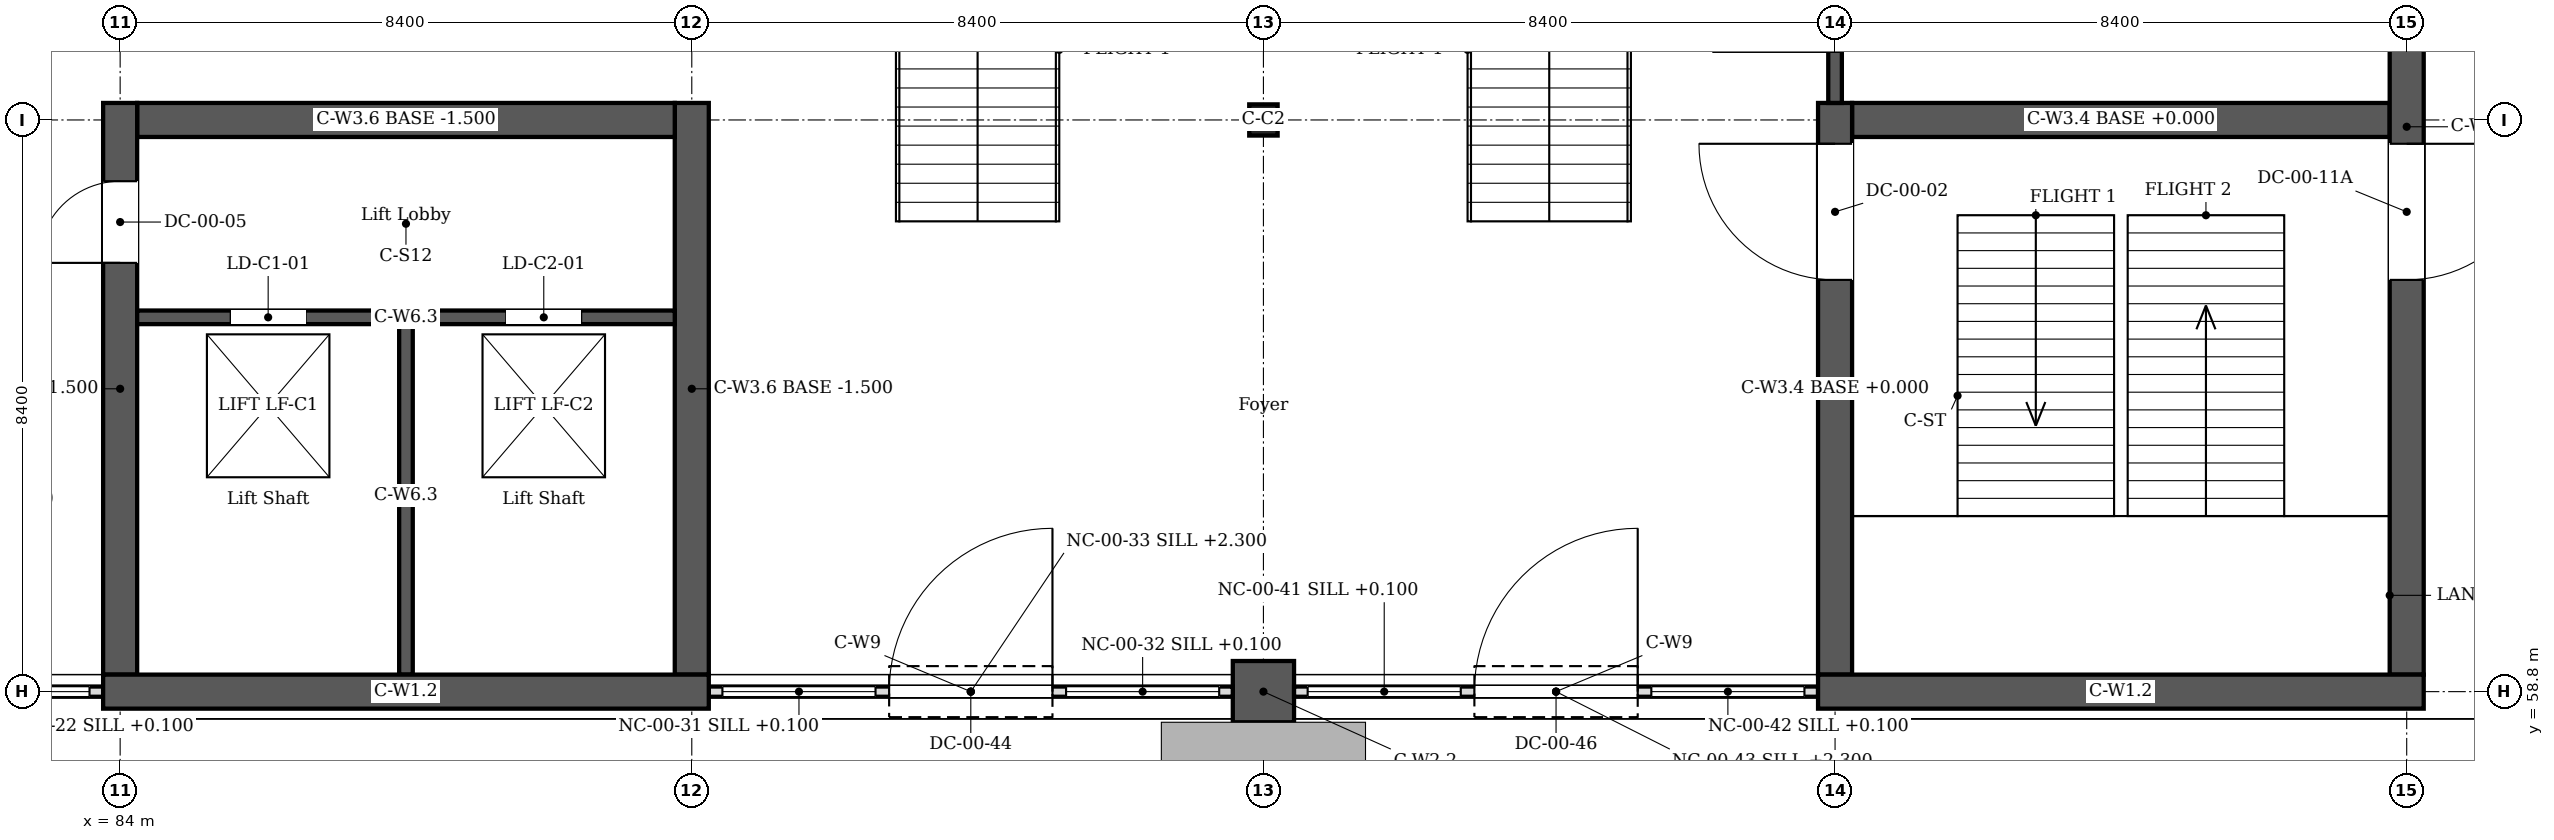
"""IFC4 building model, lengths in metres.
Left out: names, types, materials, properties, quantities, classifications, styles, units other than length and angle.
Written with IfcOpenShell. Run it as: python <this file> out.ifc"""

import sys

from ifc_helpers import new_model, si_unit, direction, frame, frame_2d, origin, origin_2d, place, context, subcontext, project, spatial, rectangle, i_section, extrude, element, fill, save


model = new_model("IFC4")
c1 = context("Model", 3, precision=1e-05, world=origin(), true_north=direction((0.0, 1.0)))
c2 = subcontext(c1, "Body", "Model", "MODEL_VIEW")
j1 = project(units=[si_unit("LENGTHUNIT", "METRE"), si_unit("PLANEANGLEUNIT", "RADIAN")], contexts=[c1])
p1 = place(None, origin())
s1 = spatial("IfcSite", under=j1, at=p1, CompositionType="ELEMENT")
p2 = place(p1, origin())
s2 = spatial("IfcBuilding", under=s1, at=p2, CompositionType="ELEMENT")
p3 = place(p2, origin())
s3 = spatial("IfcBuildingStorey", under=s2, at=p3, CompositionType="ELEMENT", Elevation=0.0)
p4 = place(p3, frame((92.65, 58.8, 0.0), z_axis=(0.0, 0.0, 1.0), x_axis=(-1.0, 0.0, 0.0)))
e1 = element("IfcWall", 1, at=p4, inside=s3, PredefinedType="SOLIDWALL", context=c2, shape_type="SweptSolid", body=[
    extrude(rectangle(XDim=8.9, YDim=0.5, at=frame_2d((4.45, 0.0))), origin(), (0.0, 0.0, 1.0), 6.0),
])
p5 = place(p3, frame((117.85, 58.8, 0.0), z_axis=(0.0, 0.0, 1.0), x_axis=(-1.0, 0.0, 0.0)))
e2 = element("IfcWall", 2, at=p5, inside=s3, PredefinedType="SOLIDWALL", context=c2, shape_type="SweptSolid", body=[
    extrude(rectangle(XDim=8.9, YDim=0.5, at=frame_2d((4.45, 0.0))), origin(), (0.0, 0.0, 1.0), 6.0),
])
p6 = place(p3, frame((100.35, 58.8, 0.0), z_axis=(0.0, 0.0, 1.0), x_axis=(1.0, 0.0, 0.0)))
e3 = element("IfcWall", 3, at=p6, inside=s3, PredefinedType="SOLIDWALL", context=c2, shape_type="SweptSolid", body=[
    extrude(rectangle(XDim=0.9, YDim=0.9, at=frame_2d((0.45, 0.0))), origin(), (0.0, 0.0, 1.0), 6.0),
])
p7 = place(p3, frame((117.6, 75.15, 0.0), z_axis=(0.0, 0.0, 1.0), x_axis=(0.0, -1.0, 0.0)))
e4 = element("IfcWall", 4, at=p7, inside=s3, PredefinedType="SOLIDWALL", context=c2, shape_type="SweptSolid", body=[
    extrude(rectangle(XDim=16.1, YDim=0.5, at=frame_2d((8.05, 0.0))), origin(), (0.0, 0.0, 1.0), 6.0),
])
p8 = place(p7, frame((8.3, 0.0, 0.0)))
e5 = element("IfcOpeningElement", 5, at=p8, cuts=e4, PredefinedType="OPENING", context=c2, shape_type="SweptSolid", body=[
    extrude(rectangle(XDim=2.0, YDim=2.1, at=frame_2d((1.0, 1.05))), frame((0.0, 0.26, 0.0), z_axis=(0.0, -1.0, 0.0), x_axis=(1.0, 0.0, 0.0)), (0.0, 0.0, 1.0), 0.52),
])
p9 = place(p3, frame((100.8, 67.2, 0.0), z_axis=(0.0, 0.0, 1.0), x_axis=(1.0, 0.0, 0.0)))
e6 = element("IfcColumn", 6, at=p9, inside=s3, PredefinedType="COLUMN", context=c2, shape_type="SweptSolid", body=[
    extrude(i_section(OverallWidth=0.417, OverallDepth=0.458, WebThickness=0.03, FlangeThickness=0.05, FilletRadius=0.022, at=origin_2d()), origin(), (0.0, 0.0, 1.0), 6.0),
])
p10 = place(p3, frame((76.05, 58.8, 0.0), z_axis=(0.0, 0.0, 1.0), x_axis=(1.0, 0.0, 0.0)))
e7 = element("IfcWall", 7, at=p10, inside=s3, PredefinedType="SOLIDWALL", context=c2, shape_type="SweptSolid", body=[
    extrude(rectangle(XDim=7.7, YDim=0.15, at=frame_2d((3.85, 0.0))), origin(), (0.0, 0.0, 1.0), 6.0),
])
p11 = place(p10, frame((2.65, 0.0, 0.0)))
e8 = element("IfcOpeningElement", 8, at=p11, cuts=e7, PredefinedType="OPENING", context=c2, shape_type="SweptSolid", body=[
    extrude(rectangle(XDim=2.4, YDim=2.1, at=frame_2d((1.2, 1.05))), frame((0.0, 0.085, 0.0), z_axis=(0.0, -1.0, 0.0), x_axis=(1.0, 0.0, 0.0)), (0.0, 0.0, 1.0), 0.17),
])
p12 = place(p10, frame((0.2, 0.0, 0.1)))
e9 = element("IfcOpeningElement", 9, at=p12, cuts=e7, PredefinedType="OPENING", context=c2, shape_type="SweptSolid", body=[
    extrude(rectangle(XDim=2.25, YDim=5.0, at=frame_2d((1.125, 2.5))), frame((0.0, 0.085, 0.0), z_axis=(0.0, -1.0, 0.0), x_axis=(1.0, 0.0, 0.0)), (0.0, 0.0, 1.0), 0.17),
])
p13 = place(p10, frame((5.25, 0.0, 0.1)))
e10 = element("IfcOpeningElement", 10, at=p13, cuts=e7, PredefinedType="OPENING", context=c2, shape_type="SweptSolid", body=[
    extrude(rectangle(XDim=2.25, YDim=5.0, at=frame_2d((1.125, 2.5))), frame((0.0, 0.085, 0.0), z_axis=(0.0, -1.0, 0.0), x_axis=(1.0, 0.0, 0.0)), (0.0, 0.0, 1.0), 0.17),
])
p14 = place(p10, frame((2.65, 0.0, 2.3)))
e11 = element("IfcOpeningElement", 11, at=p14, cuts=e7, PredefinedType="OPENING", context=c2, shape_type="SweptSolid", body=[
    extrude(rectangle(XDim=2.4, YDim=3.4, at=frame_2d((1.2, 1.7))), frame((0.0, 0.085, 0.0), z_axis=(0.0, -1.0, 0.0), x_axis=(1.0, 0.0, 0.0)), (0.0, 0.0, 1.0), 0.17),
])
p15 = place(p3, frame((92.65, 58.8, 0.0), z_axis=(0.0, 0.0, 1.0), x_axis=(1.0, 0.0, 0.0)))
e12 = element("IfcWall", 12, at=p15, inside=s3, PredefinedType="SOLIDWALL", context=c2, shape_type="SweptSolid", body=[
    extrude(rectangle(XDim=7.7, YDim=0.15, at=frame_2d((3.85, 0.0))), origin(), (0.0, 0.0, 1.0), 6.0),
])
p16 = place(p15, frame((2.65, 0.0, 0.0)))
e13 = element("IfcOpeningElement", 13, at=p16, cuts=e12, PredefinedType="OPENING", context=c2, shape_type="SweptSolid", body=[
    extrude(rectangle(XDim=2.4, YDim=2.1, at=frame_2d((1.2, 1.05))), frame((0.0, 0.085, 0.0), z_axis=(0.0, -1.0, 0.0), x_axis=(1.0, 0.0, 0.0)), (0.0, 0.0, 1.0), 0.17),
])
p17 = place(p15, frame((0.2, 0.0, 0.1)))
e14 = element("IfcOpeningElement", 14, at=p17, cuts=e12, PredefinedType="OPENING", context=c2, shape_type="SweptSolid", body=[
    extrude(rectangle(XDim=2.25, YDim=5.0, at=frame_2d((1.125, 2.5))), frame((0.0, 0.085, 0.0), z_axis=(0.0, -1.0, 0.0), x_axis=(1.0, 0.0, 0.0)), (0.0, 0.0, 1.0), 0.17),
])
p18 = place(p15, frame((5.25, 0.0, 0.1)))
e15 = element("IfcOpeningElement", 15, at=p18, cuts=e12, PredefinedType="OPENING", context=c2, shape_type="SweptSolid", body=[
    extrude(rectangle(XDim=2.25, YDim=5.0, at=frame_2d((1.125, 2.5))), frame((0.0, 0.085, 0.0), z_axis=(0.0, -1.0, 0.0), x_axis=(1.0, 0.0, 0.0)), (0.0, 0.0, 1.0), 0.17),
])
p19 = place(p15, frame((2.65, 0.0, 2.3)))
e16 = element("IfcOpeningElement", 16, at=p19, cuts=e12, PredefinedType="OPENING", context=c2, shape_type="SweptSolid", body=[
    extrude(rectangle(XDim=2.4, YDim=3.4, at=frame_2d((1.2, 1.7))), frame((0.0, 0.085, 0.0), z_axis=(0.0, -1.0, 0.0), x_axis=(1.0, 0.0, 0.0)), (0.0, 0.0, 1.0), 0.17),
])
p20 = place(p3, frame((101.25, 58.8, 0.0), z_axis=(0.0, 0.0, 1.0), x_axis=(1.0, 0.0, 0.0)))
e17 = element("IfcWall", 17, at=p20, inside=s3, PredefinedType="SOLIDWALL", context=c2, shape_type="SweptSolid", body=[
    extrude(rectangle(XDim=7.7, YDim=0.15, at=frame_2d((3.85, 0.0))), origin(), (0.0, 0.0, 1.0), 6.0),
])
p21 = place(p20, frame((2.65, 0.0, 0.0)))
e18 = element("IfcOpeningElement", 18, at=p21, cuts=e17, PredefinedType="OPENING", context=c2, shape_type="SweptSolid", body=[
    extrude(rectangle(XDim=2.4, YDim=2.1, at=frame_2d((1.2, 1.05))), frame((0.0, 0.085, 0.0), z_axis=(0.0, -1.0, 0.0), x_axis=(1.0, 0.0, 0.0)), (0.0, 0.0, 1.0), 0.17),
])
p22 = place(p20, frame((0.2, 0.0, 0.1)))
e19 = element("IfcOpeningElement", 19, at=p22, cuts=e17, PredefinedType="OPENING", context=c2, shape_type="SweptSolid", body=[
    extrude(rectangle(XDim=2.25, YDim=5.0, at=frame_2d((1.125, 2.5))), frame((0.0, 0.085, 0.0), z_axis=(0.0, -1.0, 0.0), x_axis=(1.0, 0.0, 0.0)), (0.0, 0.0, 1.0), 0.17),
])
p23 = place(p20, frame((5.25, 0.0, 0.1)))
e20 = element("IfcOpeningElement", 20, at=p23, cuts=e17, PredefinedType="OPENING", context=c2, shape_type="SweptSolid", body=[
    extrude(rectangle(XDim=2.25, YDim=5.0, at=frame_2d((1.125, 2.5))), frame((0.0, 0.085, 0.0), z_axis=(0.0, -1.0, 0.0), x_axis=(1.0, 0.0, 0.0)), (0.0, 0.0, 1.0), 0.17),
])
p24 = place(p20, frame((2.65, 0.0, 2.3)))
e21 = element("IfcOpeningElement", 21, at=p24, cuts=e17, PredefinedType="OPENING", context=c2, shape_type="SweptSolid", body=[
    extrude(rectangle(XDim=2.4, YDim=3.4, at=frame_2d((1.2, 1.7))), frame((0.0, 0.085, 0.0), z_axis=(0.0, -1.0, 0.0), x_axis=(1.0, 0.0, 0.0)), (0.0, 0.0, 1.0), 0.17),
])
p25 = place(p3, frame((109.2, 59.05, 0.0), z_axis=(0.0, 0.0, 1.0), x_axis=(0.0, 1.0, 0.0)))
e22 = element("IfcWall", 22, at=p25, inside=s3, PredefinedType="SOLIDWALL", context=c2, shape_type="SweptSolid", body=[
    extrude(rectangle(XDim=8.4, YDim=0.5, at=frame_2d((4.2, 0.0))), origin(), (0.0, 0.0, 1.0), 6.0),
])
p26 = place(p25, frame((5.8, 0.0, 0.0)))
e23 = element("IfcOpeningElement", 23, at=p26, cuts=e22, PredefinedType="OPENING", context=c2, shape_type="SweptSolid", body=[
    extrude(rectangle(XDim=2.0, YDim=2.1, at=frame_2d((1.0, 1.05))), frame((0.0, 0.26, 0.0), z_axis=(0.0, -1.0, 0.0), x_axis=(1.0, 0.0, 0.0)), (0.0, 0.0, 1.0), 0.52),
])
p27 = place(p3, frame((109.45, 67.2, 0.0), z_axis=(0.0, 0.0, 1.0), x_axis=(1.0, 0.0, 0.0)))
e24 = element("IfcWall", 24, at=p27, inside=s3, PredefinedType="SOLIDWALL", context=c2, shape_type="SweptSolid", body=[
    extrude(rectangle(XDim=7.9, YDim=0.5, at=frame_2d((3.95, 0.0))), origin(), (0.0, 0.0, 1.0), 6.0),
])
p28 = place(p3, frame((92.4, 59.05, -1.5), z_axis=(0.0, 0.0, 1.0), x_axis=(0.0, 1.0, 0.0)))
e25 = element("IfcWall", 25, at=p28, inside=s3, PredefinedType="SOLIDWALL", context=c2, shape_type="SweptSolid", body=[
    extrude(rectangle(XDim=8.4, YDim=0.5, at=frame_2d((4.2, 0.0))), origin(), (0.0, 0.0, 1.0), 7.5),
])
p29 = place(p3, frame((84.0, 59.05, -1.5), z_axis=(0.0, 0.0, 1.0), x_axis=(0.0, 1.0, 0.0)))
e26 = element("IfcWall", 26, at=p29, inside=s3, PredefinedType="SOLIDWALL", context=c2, shape_type="SweptSolid", body=[
    extrude(rectangle(XDim=8.4, YDim=0.5, at=frame_2d((4.2, 0.0))), origin(), (0.0, 0.0, 1.0), 7.5),
])
p30 = place(p29, frame((6.05, 0.0, 1.5)))
e27 = element("IfcOpeningElement", 27, at=p30, cuts=e26, PredefinedType="OPENING", context=c2, shape_type="SweptSolid", body=[
    extrude(rectangle(XDim=1.2, YDim=2.1, at=frame_2d((0.6, 1.05))), frame((0.0, 0.26, 0.0), z_axis=(0.0, -1.0, 0.0), x_axis=(1.0, 0.0, 0.0)), (0.0, 0.0, 1.0), 0.52),
])
p31 = place(p3, frame((84.25, 67.2, -1.5), z_axis=(0.0, 0.0, 1.0), x_axis=(1.0, 0.0, 0.0)))
e28 = element("IfcWall", 28, at=p31, inside=s3, PredefinedType="SOLIDWALL", context=c2, shape_type="SweptSolid", body=[
    extrude(rectangle(XDim=7.9, YDim=0.5, at=frame_2d((3.95, 0.0))), origin(), (0.0, 0.0, 1.0), 7.5),
])
p32 = place(p3, frame((88.2, 59.05, -1.5), z_axis=(0.0, 0.0, 1.0), x_axis=(0.0, 1.0, 0.0)))
e29 = element("IfcWall", 29, at=p32, inside=s3, PredefinedType="PARTITIONING", context=c2, shape_type="SweptSolid", body=[
    extrude(rectangle(XDim=5.25, YDim=0.2, at=frame_2d((2.625, 0.0))), origin(), (0.0, 0.0, 1.0), 7.5),
])
p33 = place(p3, frame((84.25, 64.3, -1.5), z_axis=(0.0, 0.0, 1.0), x_axis=(1.0, 0.0, 0.0)))
e30 = element("IfcWall", 30, at=p33, inside=s3, PredefinedType="PARTITIONING", context=c2, shape_type="SweptSolid", body=[
    extrude(rectangle(XDim=7.9, YDim=0.2, at=frame_2d((3.95, 0.0))), origin(), (0.0, 0.0, 1.0), 7.5),
])
p34 = place(p33, frame((1.375, 0.0, 1.5)))
e31 = element("IfcOpeningElement", 31, at=p34, cuts=e30, PredefinedType="OPENING", context=c2, shape_type="SweptSolid", body=[
    extrude(rectangle(XDim=1.1, YDim=2.1, at=frame_2d((0.55, 1.05))), frame((0.0, 0.11, 0.0), z_axis=(0.0, -1.0, 0.0), x_axis=(1.0, 0.0, 0.0)), (0.0, 0.0, 1.0), 0.22),
])
p35 = place(p33, frame((5.425, 0.0, 1.5)))
e32 = element("IfcOpeningElement", 32, at=p35, cuts=e30, PredefinedType="OPENING", context=c2, shape_type="SweptSolid", body=[
    extrude(rectangle(XDim=1.1, YDim=2.1, at=frame_2d((0.55, 1.05))), frame((0.0, 0.11, 0.0), z_axis=(0.0, -1.0, 0.0), x_axis=(1.0, 0.0, 0.0)), (0.0, 0.0, 1.0), 0.22),
])
p36 = place(p3, frame((109.2, 67.45, 0.0), z_axis=(0.0, 0.0, 1.0), x_axis=(0.0, 1.0, 0.0)))
e33 = element("IfcWall", 33, at=p36, inside=s3, PredefinedType="PARTITIONING", context=c2, shape_type="SweptSolid", body=[
    extrude(rectangle(XDim=7.9, YDim=0.2, at=frame_2d((3.95, 0.0))), origin(), (0.0, 0.0, 1.0), 6.0),
])
p37 = place(p36, frame((0.75, 0.0, 0.0)))
e34 = element("IfcOpeningElement", 34, at=p37, cuts=e33, PredefinedType="OPENING", context=c2, shape_type="SweptSolid", body=[
    extrude(rectangle(XDim=1.8, YDim=2.1, at=frame_2d((0.9, 1.05))), frame((0.0, 0.11, 0.0), z_axis=(0.0, -1.0, 0.0), x_axis=(1.0, 0.0, 0.0)), (0.0, 0.0, 1.0), 0.22),
])
p38 = place(p13, origin())
e35 = element("IfcWindow", 35, at=p38, inside=s3, PartitioningType="SINGLE_PANEL", PredefinedType="WINDOW", context=c2, shape_type="SweptSolid", body=[
    extrude(rectangle(XDim=2.25, YDim=5.0, at=frame_2d((1.125, 2.5))), frame((0.0, 0.03, 0.0), z_axis=(0.0, -1.0, 0.0), x_axis=(1.0, 0.0, 0.0)), (0.0, 0.0, 1.0), 0.06),
])
fill(e10, e35)
p39 = place(p16, origin())
e36 = element("IfcDoor", 36, at=p39, inside=s3, OperationType="DOUBLE_DOOR_DOUBLE_SWING", PredefinedType="DOOR", context=c2, shape_type="SweptSolid", body=[
    extrude(rectangle(XDim=2.4, YDim=2.1, at=frame_2d((1.2, 1.05))), frame((0.0, 0.025, 0.0), z_axis=(0.0, -1.0, 0.0), x_axis=(1.0, 0.0, 0.0)), (0.0, 0.0, 1.0), 0.05),
])
fill(e13, e36)
p40 = place(p17, origin())
e37 = element("IfcWindow", 37, at=p40, inside=s3, PartitioningType="SINGLE_PANEL", PredefinedType="WINDOW", context=c2, shape_type="SweptSolid", body=[
    extrude(rectangle(XDim=2.25, YDim=5.0, at=frame_2d((1.125, 2.5))), frame((0.0, 0.03, 0.0), z_axis=(0.0, -1.0, 0.0), x_axis=(1.0, 0.0, 0.0)), (0.0, 0.0, 1.0), 0.06),
])
fill(e14, e37)
p41 = place(p18, origin())
e38 = element("IfcWindow", 38, at=p41, inside=s3, PartitioningType="SINGLE_PANEL", PredefinedType="WINDOW", context=c2, shape_type="SweptSolid", body=[
    extrude(rectangle(XDim=2.25, YDim=5.0, at=frame_2d((1.125, 2.5))), frame((0.0, 0.03, 0.0), z_axis=(0.0, -1.0, 0.0), x_axis=(1.0, 0.0, 0.0)), (0.0, 0.0, 1.0), 0.06),
])
fill(e15, e38)
p42 = place(p19, origin())
e39 = element("IfcWindow", 39, at=p42, inside=s3, PartitioningType="SINGLE_PANEL", PredefinedType="WINDOW", context=c2, shape_type="SweptSolid", body=[
    extrude(rectangle(XDim=2.4, YDim=3.4, at=frame_2d((1.2, 1.7))), frame((0.0, 0.03, 0.0), z_axis=(0.0, -1.0, 0.0), x_axis=(1.0, 0.0, 0.0)), (0.0, 0.0, 1.0), 0.06),
])
fill(e16, e39)
p43 = place(p21, origin())
e40 = element("IfcDoor", 40, at=p43, inside=s3, OperationType="DOUBLE_DOOR_DOUBLE_SWING", PredefinedType="DOOR", context=c2, shape_type="SweptSolid", body=[
    extrude(rectangle(XDim=2.4, YDim=2.1, at=frame_2d((1.2, 1.05))), frame((0.0, 0.025, 0.0), z_axis=(0.0, -1.0, 0.0), x_axis=(1.0, 0.0, 0.0)), (0.0, 0.0, 1.0), 0.05),
])
fill(e18, e40)
p44 = place(p22, origin())
e41 = element("IfcWindow", 41, at=p44, inside=s3, PartitioningType="SINGLE_PANEL", PredefinedType="WINDOW", context=c2, shape_type="SweptSolid", body=[
    extrude(rectangle(XDim=2.25, YDim=5.0, at=frame_2d((1.125, 2.5))), frame((0.0, 0.03, 0.0), z_axis=(0.0, -1.0, 0.0), x_axis=(1.0, 0.0, 0.0)), (0.0, 0.0, 1.0), 0.06),
])
fill(e19, e41)
p45 = place(p23, origin())
e42 = element("IfcWindow", 42, at=p45, inside=s3, PartitioningType="SINGLE_PANEL", PredefinedType="WINDOW", context=c2, shape_type="SweptSolid", body=[
    extrude(rectangle(XDim=2.25, YDim=5.0, at=frame_2d((1.125, 2.5))), frame((0.0, 0.03, 0.0), z_axis=(0.0, -1.0, 0.0), x_axis=(1.0, 0.0, 0.0)), (0.0, 0.0, 1.0), 0.06),
])
fill(e20, e42)
p46 = place(p24, origin())
e43 = element("IfcWindow", 43, at=p46, inside=s3, PartitioningType="SINGLE_PANEL", PredefinedType="WINDOW", context=c2, shape_type="SweptSolid", body=[
    extrude(rectangle(XDim=2.4, YDim=3.4, at=frame_2d((1.2, 1.7))), frame((0.0, 0.03, 0.0), z_axis=(0.0, -1.0, 0.0), x_axis=(1.0, 0.0, 0.0)), (0.0, 0.0, 1.0), 0.06),
])
fill(e21, e43)
p47 = place(p34, origin())
e44 = element("IfcDoor", 44, at=p47, inside=s3, OperationType="SLIDING_TO_LEFT", PredefinedType="DOOR", context=c2, shape_type="SweptSolid", body=[
    extrude(rectangle(XDim=1.1, YDim=2.1, at=frame_2d((0.55, 1.05))), frame((0.0, 0.025, 0.0), z_axis=(0.0, -1.0, 0.0), x_axis=(1.0, 0.0, 0.0)), (0.0, 0.0, 1.0), 0.05),
])
fill(e31, e44)
p48 = place(p35, origin())
e45 = element("IfcDoor", 45, at=p48, inside=s3, OperationType="SLIDING_TO_LEFT", PredefinedType="DOOR", context=c2, shape_type="SweptSolid", body=[
    extrude(rectangle(XDim=1.1, YDim=2.1, at=frame_2d((0.55, 1.05))), frame((0.0, 0.025, 0.0), z_axis=(0.0, -1.0, 0.0), x_axis=(1.0, 0.0, 0.0)), (0.0, 0.0, 1.0), 0.05),
])
fill(e32, e45)
p49 = place(p26, origin())
e46 = element("IfcDoor", 46, at=p49, inside=s3, OperationType="DOUBLE_DOOR_DOUBLE_SWING", PredefinedType="DOOR", context=c2, shape_type="SweptSolid", body=[
    extrude(rectangle(XDim=2.0, YDim=2.1, at=frame_2d((1.0, 1.05))), frame((0.0, 0.025, 0.0), z_axis=(0.0, -1.0, 0.0), x_axis=(1.0, 0.0, 0.0)), (0.0, 0.0, 1.0), 0.05),
])
fill(e23, e46)
p50 = place(p30, origin())
e47 = element("IfcDoor", 47, at=p50, inside=s3, OperationType="SINGLE_SWING_LEFT", PredefinedType="DOOR", context=c2, shape_type="SweptSolid", body=[
    extrude(rectangle(XDim=1.2, YDim=2.1, at=frame_2d((0.6, 1.05))), frame((0.0, 0.025, 0.0), z_axis=(0.0, -1.0, 0.0), x_axis=(1.0, 0.0, 0.0)), (0.0, 0.0, 1.0), 0.05),
])
fill(e27, e47)
p51 = place(p8, origin())
e48 = element("IfcDoor", 48, at=p51, inside=s3, OperationType="DOUBLE_DOOR_DOUBLE_SWING", PredefinedType="DOOR", context=c2, shape_type="SweptSolid", body=[
    extrude(rectangle(XDim=2.0, YDim=2.1, at=frame_2d((1.0, 1.05))), frame((0.0, 0.025, 0.0), z_axis=(0.0, -1.0, 0.0), x_axis=(1.0, 0.0, 0.0)), (0.0, 0.0, 1.0), 0.05),
])
fill(e5, e48)
p52 = place(p37, origin())
e49 = element("IfcDoor", 49, at=p52, inside=s3, OperationType="DOUBLE_DOOR_DOUBLE_SWING", PredefinedType="DOOR", context=c2, shape_type="SweptSolid", body=[
    extrude(rectangle(XDim=1.8, YDim=2.1, at=frame_2d((0.9, 1.05))), frame((0.0, 0.025, 0.0), z_axis=(0.0, -1.0, 0.0), x_axis=(1.0, 0.0, 0.0)), (0.0, 0.0, 1.0), 0.05),
])
fill(e34, e49)
save(model, sys.argv[1])
